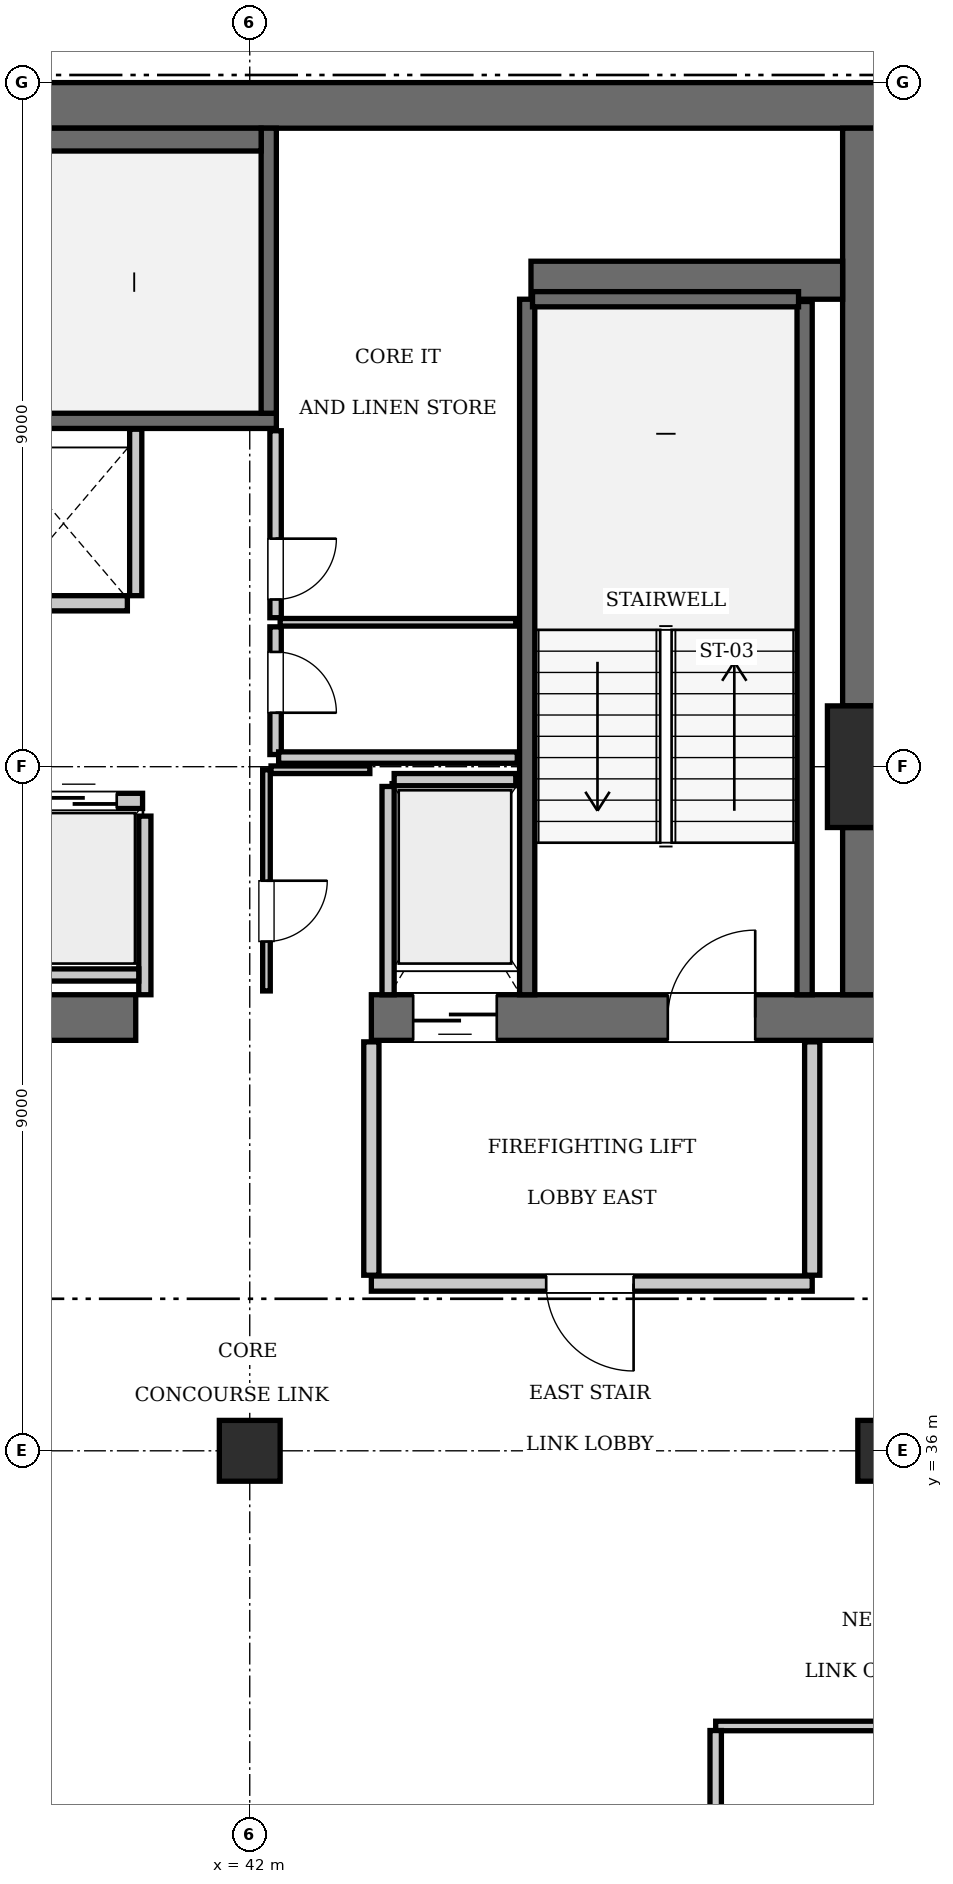
"""IFC4 building model, lengths in metres.
Left out: names, types, materials, properties, quantities, classifications, styles, units other than length and angle.
Written with IfcOpenShell. Run it as: python <this file> out.ifc"""

import sys

from ifc_helpers import new_model, si_unit, direction, frame, frame_2d, origin, origin_2d, place, context, subcontext, project, spatial, rectangle, extrude, element, fill, save


model = new_model("IFC4")
c1 = context("Model", 3, precision=1e-05, world=origin(), true_north=direction((0.0, 1.0)))
c2 = subcontext(c1, "Body", "Model", "MODEL_VIEW")
j1 = project(units=[si_unit("LENGTHUNIT", "METRE"), si_unit("PLANEANGLEUNIT", "RADIAN")], contexts=[c1])
p1 = place(None, origin())
s1 = spatial("IfcSite", under=j1, at=p1, CompositionType="ELEMENT")
p2 = place(p1, origin())
s2 = spatial("IfcBuilding", under=s1, at=p2, CompositionType="ELEMENT")
p3 = place(p2, frame((0.0, 0.0, 285.6)))
s3 = spatial("IfcBuildingStorey", under=s2, at=p3, CompositionType="ELEMENT", Elevation=285.6)
p4 = place(p3, frame((50.4, 45.0, 0.0), z_axis=(0.0, 0.0, 1.0), x_axis=(1.0, 0.0, 0.0)))
e1 = element("IfcColumn", 1, at=p4, inside=s3, PredefinedType="COLUMN", context=c2, shape_type="SweptSolid", body=[
    extrude(rectangle(XDim=1.6, YDim=1.6, at=origin_2d()), origin(), (0.0, 0.0, 1.0), 3.85),
])
p5 = place(p3, frame((25.2, 53.7, 0.0), z_axis=(0.0, 0.0, 1.0), x_axis=(1.0, 0.0, 0.0)))
e2 = element("IfcWall", 2, at=p5, inside=s3, PredefinedType="SHEAR", context=c2, shape_type="SweptSolid", body=[
    extrude(rectangle(XDim=25.2, YDim=0.6, at=frame_2d((12.6, 0.0))), origin(), (0.0, 0.0, 1.0), 3.85),
])
p6 = place(p3, frame((35.1, 41.7, 0.0), z_axis=(0.0, 0.0, 1.0), x_axis=(1.0, 0.0, 0.0)))
e3 = element("IfcWall", 3, at=p6, inside=s3, PredefinedType="SHEAR", context=c2, shape_type="SweptSolid", body=[
    extrude(rectangle(XDim=5.4, YDim=0.6, at=frame_2d((2.7, 0.0))), origin(), (0.0, 0.0, 1.0), 3.85),
])
p7 = place(p3, frame((43.6, 41.7, 0.0), z_axis=(0.0, 0.0, 1.0), x_axis=(1.0, 0.0, 0.0)))
e4 = element("IfcWall", 4, at=p7, inside=s3, PredefinedType="SHEAR", context=c2, shape_type="SweptSolid", body=[
    extrude(rectangle(XDim=6.8, YDim=0.6, at=frame_2d((3.4, 0.0))), origin(), (0.0, 0.0, 1.0), 3.85),
])
p8 = place(p7, frame((3.9, 0.0, 0.0)))
e5 = element("IfcOpeningElement", 5, at=p8, cuts=e4, PredefinedType="OPENING", context=c2, shape_type="SweptSolid", body=[
    extrude(rectangle(XDim=1.15, YDim=2.15, at=frame_2d((0.575, 1.075))), frame((0.0, 0.31, 0.0), z_axis=(0.0, -1.0, 0.0), x_axis=(1.0, 0.0, 0.0)), (0.0, 0.0, 1.0), 0.62),
])
p9 = place(p7, frame((0.55, 0.0, 0.0)))
e6 = element("IfcOpeningElement", 6, at=p9, cuts=e4, PredefinedType="OPENING", context=c2, shape_type="SweptSolid", body=[
    extrude(rectangle(XDim=1.1, YDim=2.2, at=frame_2d((0.55, 1.1))), frame((0.0, 0.31, 0.0), z_axis=(0.0, -1.0, 0.0), x_axis=(1.0, 0.0, 0.0)), (0.0, 0.0, 1.0), 0.62),
])
p10 = place(p3, frame((50.1, 42.0, 0.0), z_axis=(0.0, 0.0, 1.0), x_axis=(0.0, 1.0, 0.0)))
e7 = element("IfcWall", 7, at=p10, inside=s3, PredefinedType="SHEAR", context=c2, shape_type="SweptSolid", body=[
    extrude(rectangle(XDim=2.2, YDim=0.6, at=frame_2d((1.1, 0.0))), origin(), (0.0, 0.0, 1.0), 3.85),
])
p11 = place(p3, frame((50.1, 45.8, 0.0), z_axis=(0.0, 0.0, 1.0), x_axis=(0.0, 1.0, 0.0)))
e8 = element("IfcWall", 8, at=p11, inside=s3, PredefinedType="SHEAR", context=c2, shape_type="SweptSolid", body=[
    extrude(rectangle(XDim=7.6, YDim=0.6, at=frame_2d((3.8, 0.0))), origin(), (0.0, 0.0, 1.0), 3.85),
])
p12 = place(p3, frame((45.7, 51.4, 0.0), z_axis=(0.0, 0.0, 1.0), x_axis=(1.0, 0.0, 0.0)))
e9 = element("IfcWall", 9, at=p12, inside=s3, PredefinedType="SHEAR", context=c2, shape_type="SweptSolid", body=[
    extrude(rectangle(XDim=4.1, YDim=0.5, at=frame_2d((2.05, 0.0))), origin(), (0.0, 0.0, 1.0), 3.85),
])
for number, where, z_axis, x_axis in (
    (10, (42.0, 36.0, 0.0), (0.0, 0.0, 1.0), (1.0, 0.0, 0.0)),
    (11, (50.4, 36.0, 0.0), (0.0, 0.0, 1.0), (1.0, 0.0, 0.0)),
):
    element("IfcColumn", number, at=place(p3, frame(where, z_axis=z_axis, x_axis=x_axis)), inside=s3, PredefinedType="COLUMN", context=c2, shape_type="SweptSolid", body=[
        extrude(rectangle(XDim=0.8, YDim=0.8, at=origin_2d()), origin(), (0.0, 0.0, 1.0), 3.85),
    ])
p13 = place(p3, frame((33.25, 49.55, 0.0), z_axis=(0.0, 0.0, 1.0), x_axis=(1.0, 0.0, 0.0)))
e12 = element("IfcWall", 12, at=p13, inside=s3, PredefinedType="SOLIDWALL", context=c2, shape_type="SweptSolid", body=[
    extrude(rectangle(XDim=9.1, YDim=0.2, at=frame_2d((4.55, 0.0))), origin(), (0.0, 0.0, 1.0), 3.61),
])
p14 = place(p3, frame((42.25, 49.65, 0.0), z_axis=(0.0, 0.0, 1.0), x_axis=(0.0, 1.0, 0.0)))
e13 = element("IfcWall", 13, at=p14, inside=s3, PredefinedType="SOLIDWALL", context=c2, shape_type="SweptSolid", body=[
    extrude(rectangle(XDim=3.75, YDim=0.2, at=frame_2d((1.875, 0.0))), origin(), (0.0, 0.0, 1.0), 3.61),
])
p15 = place(p3, frame((33.45, 53.25, 0.0), z_axis=(0.0, 0.0, 1.0), x_axis=(1.0, 0.0, 0.0)))
e14 = element("IfcWall", 14, at=p15, inside=s3, PredefinedType="SOLIDWALL", context=c2, shape_type="SweptSolid", body=[
    extrude(rectangle(XDim=8.7, YDim=0.3, at=frame_2d((4.35, 0.0))), origin(), (0.0, 0.0, 1.0), 3.61),
])
p16 = place(p3, frame((45.65, 42.0, 0.0), z_axis=(0.0, 0.0, 1.0), x_axis=(0.0, 1.0, 0.0)))
e15 = element("IfcWall", 15, at=p16, inside=s3, PredefinedType="SOLIDWALL", context=c2, shape_type="SweptSolid", body=[
    extrude(rectangle(XDim=9.15, YDim=0.2, at=frame_2d((4.575, 0.0))), origin(), (0.0, 0.0, 1.0), 3.61),
])
p17 = place(p3, frame((49.3, 42.0, 0.0), z_axis=(0.0, 0.0, 1.0), x_axis=(0.0, 1.0, 0.0)))
e16 = element("IfcWall", 16, at=p17, inside=s3, PredefinedType="SOLIDWALL", context=c2, shape_type="SweptSolid", body=[
    extrude(rectangle(XDim=9.12, YDim=0.2, at=frame_2d((4.56, 0.0))), origin(), (0.0, 0.0, 1.0), 3.61),
])
p18 = place(p3, frame((45.72, 51.15, 0.0), z_axis=(0.0, 0.0, 1.0), x_axis=(1.0, 0.0, 0.0)))
e17 = element("IfcWall", 17, at=p18, inside=s3, PredefinedType="SOLIDWALL", context=c2, shape_type="SweptSolid", body=[
    extrude(rectangle(XDim=3.5, YDim=0.2, at=frame_2d((1.75, 0.0))), origin(), (0.0, 0.0, 1.0), 3.61),
])
p19 = place(p3, frame((38.91, 44.55, 0.0), z_axis=(0.0, 0.0, 1.0), x_axis=(1.0, 0.0, 0.0)))
e18 = element("IfcWall", 18, at=p19, inside=s3, PredefinedType="SOLIDWALL", context=c2, shape_type="SweptSolid", body=[
    extrude(rectangle(XDim=1.68, YDim=0.2, at=frame_2d((0.84, 0.0))), origin(), (0.0, 0.0, 1.0), 3.61),
])
p20 = place(p19, frame((0.34, 0.0, 0.0)))
e19 = element("IfcOpeningElement", 19, at=p20, cuts=e18, PredefinedType="OPENING", context=c2, shape_type="SweptSolid", body=[
    extrude(rectangle(XDim=1.0, YDim=2.15, at=frame_2d((0.5, 1.075))), frame((0.0, 0.11, 0.0), z_axis=(0.0, -1.0, 0.0), x_axis=(1.0, 0.0, 0.0)), (0.0, 0.0, 1.0), 0.22),
])
p21 = place(p3, frame((38.71, 47.15, 0.0), z_axis=(0.0, 0.0, 1.0), x_axis=(1.0, 0.0, 0.0)))
e20 = element("IfcWall", 20, at=p21, inside=s3, PredefinedType="SOLIDWALL", context=c2, shape_type="SweptSolid", body=[
    extrude(rectangle(XDim=1.68, YDim=0.2, at=frame_2d((0.84, 0.0))), origin(), (0.0, 0.0, 1.0), 3.61),
])
p22 = place(p3, frame((43.9, 44.83, 0.0), z_axis=(0.0, 0.0, 1.0), x_axis=(1.0, 0.0, 0.0)))
e21 = element("IfcWall", 21, at=p22, inside=s3, PredefinedType="SOLIDWALL", context=c2, shape_type="SweptSolid", body=[
    extrude(rectangle(XDim=1.6, YDim=0.16, at=frame_2d((0.8, 0.0))), origin(), (0.0, 0.0, 1.0), 3.61),
])
p23 = place(p3, frame((43.82, 42.0, 0.0), z_axis=(0.0, 0.0, 1.0), x_axis=(0.0, 1.0, 0.0)))
e22 = element("IfcWall", 22, at=p23, inside=s3, PredefinedType="SOLIDWALL", context=c2, shape_type="SweptSolid", body=[
    extrude(rectangle(XDim=2.74, YDim=0.16, at=frame_2d((1.37, 0.0))), origin(), (0.0, 0.0, 1.0), 3.61),
])
p24 = place(p3, frame((40.62, 42.0, 0.0), z_axis=(0.0, 0.0, 1.0), x_axis=(0.0, 1.0, 0.0)))
e23 = element("IfcWall", 23, at=p24, inside=s3, PredefinedType="SOLIDWALL", context=c2, shape_type="SweptSolid", body=[
    extrude(rectangle(XDim=2.35, YDim=0.16, at=frame_2d((1.175, 0.0))), origin(), (0.0, 0.0, 1.0), 3.61),
])
p25 = place(p3, frame((35.52, 42.26, 0.0), z_axis=(0.0, 0.0, 1.0), x_axis=(1.0, 0.0, 0.0)))
e24 = element("IfcWall", 24, at=p25, inside=s3, PredefinedType="SOLIDWALL", context=c2, shape_type="SweptSolid", body=[
    extrude(rectangle(XDim=5.02, YDim=0.16, at=frame_2d((2.51, 0.0))), origin(), (0.0, 0.0, 1.0), 3.61),
])
p26 = place(p3, frame((40.5, 47.25, 0.0), z_axis=(0.0, 0.0, 1.0), x_axis=(0.0, 1.0, 0.0)))
e25 = element("IfcWall", 25, at=p26, inside=s3, PredefinedType="SOLIDWALL", context=c2, shape_type="SweptSolid", body=[
    extrude(rectangle(XDim=2.19, YDim=0.16, at=frame_2d((1.095, 0.0))), origin(), (0.0, 0.0, 1.0), 3.61),
])
p27 = place(p3, frame((43.6, 38.2, 0.0), z_axis=(0.0, 0.0, 1.0), x_axis=(1.0, 0.0, 0.0)))
e26 = element("IfcWall", 26, at=p27, inside=s3, PredefinedType="PARTITIONING", context=c2, shape_type="SweptSolid", body=[
    extrude(rectangle(XDim=5.8, YDim=0.2, at=frame_2d((2.9, 0.0))), origin(), (0.0, 0.0, 1.0), 3.61),
])
p28 = place(p27, frame((2.3, 0.0, 0.0)))
e27 = element("IfcOpeningElement", 27, at=p28, cuts=e26, PredefinedType="OPENING", context=c2, shape_type="SweptSolid", body=[
    extrude(rectangle(XDim=1.15, YDim=2.15, at=frame_2d((0.575, 1.075))), frame((0.0, 0.11, 0.0), z_axis=(0.0, -1.0, 0.0), x_axis=(1.0, 0.0, 0.0)), (0.0, 0.0, 1.0), 0.22),
])
for number, where, z_axis, x_axis in (
    (28, (43.6, 38.31, 0.0), (0.0, 0.0, 1.0), (0.0, 1.0, 0.0)),
    (29, (49.4, 38.31, 0.0), (0.0, 0.0, 1.0), (0.0, 1.0, 0.0)),
):
    element("IfcWall", number, at=place(p3, frame(where, z_axis=z_axis, x_axis=x_axis)), inside=s3, PredefinedType="PARTITIONING", context=c2, shape_type="SweptSolid", body=[
        extrude(rectangle(XDim=3.07, YDim=0.2, at=frame_2d((1.535, 0.0))), origin(), (0.0, 0.0, 1.0), 3.61),
    ])
p29 = place(p3, frame((42.22, 42.05, 0.0), z_axis=(0.0, 0.0, 1.0), x_axis=(0.0, 1.0, 0.0)))
e30 = element("IfcWall", 30, at=p29, inside=s3, PredefinedType="PARTITIONING", context=c2, shape_type="SweptSolid", body=[
    extrude(rectangle(XDim=2.91, YDim=0.1, at=frame_2d((1.455, 0.0))), origin(), (0.0, 0.0, 1.0), 3.61),
])
p30 = place(p29, frame((0.65, 0.0, 0.0)))
e31 = element("IfcOpeningElement", 31, at=p30, cuts=e30, PredefinedType="OPENING", context=c2, shape_type="SweptSolid", body=[
    extrude(rectangle(XDim=0.8, YDim=2.05, at=frame_2d((0.4, 1.025))), frame((0.0, 0.06, 0.0), z_axis=(0.0, -1.0, 0.0), x_axis=(1.0, 0.0, 0.0)), (0.0, 0.0, 1.0), 0.12),
])
p31 = place(p3, frame((42.28, 44.96, 0.0), z_axis=(0.0, 0.0, 1.0), x_axis=(1.0, 0.0, 0.0)))
e32 = element("IfcWall", 32, at=p31, inside=s3, PredefinedType="PARTITIONING", context=c2, shape_type="SweptSolid", body=[
    extrude(rectangle(XDim=1.3, YDim=0.1, at=frame_2d((0.65, 0.0))), origin(), (0.0, 0.0, 1.0), 3.61),
])
p32 = place(p3, frame((42.34, 45.16, 0.0), z_axis=(0.0, 0.0, 1.0), x_axis=(0.0, 1.0, 0.0)))
e33 = element("IfcWall", 33, at=p32, inside=s3, PredefinedType="PARTITIONING", context=c2, shape_type="SweptSolid", body=[
    extrude(rectangle(XDim=1.68, YDim=0.15, at=frame_2d((0.84, 0.0))), origin(), (0.0, 0.0, 1.0), 3.61),
])
p33 = place(p32, frame((0.55, 0.0, 0.0)))
e34 = element("IfcOpeningElement", 34, at=p33, cuts=e33, PredefinedType="OPENING", context=c2, shape_type="SweptSolid", body=[
    extrude(rectangle(XDim=0.8, YDim=2.05, at=frame_2d((0.4, 1.025))), frame((0.0, 0.085, 0.0), z_axis=(0.0, -1.0, 0.0), x_axis=(1.0, 0.0, 0.0)), (0.0, 0.0, 1.0), 0.17),
])
p34 = place(p3, frame((42.34, 46.96, 0.0), z_axis=(0.0, 0.0, 1.0), x_axis=(0.0, 1.0, 0.0)))
e35 = element("IfcWall", 35, at=p34, inside=s3, PredefinedType="PARTITIONING", context=c2, shape_type="SweptSolid", body=[
    extrude(rectangle(XDim=2.46, YDim=0.15, at=frame_2d((1.23, 0.0))), origin(), (0.0, 0.0, 1.0), 3.61),
])
p35 = place(p34, frame((0.24, 0.0, 0.0)))
e36 = element("IfcOpeningElement", 36, at=p35, cuts=e35, PredefinedType="OPENING", context=c2, shape_type="SweptSolid", body=[
    extrude(rectangle(XDim=0.8, YDim=2.05, at=frame_2d((0.4, 1.025))), frame((0.0, 0.085, 0.0), z_axis=(0.0, -1.0, 0.0), x_axis=(1.0, 0.0, 0.0)), (0.0, 0.0, 1.0), 0.17),
])
p36 = place(p3, frame((42.4, 46.9, 0.0), z_axis=(0.0, 0.0, 1.0), x_axis=(1.0, 0.0, 0.0)))
e37 = element("IfcWall", 37, at=p36, inside=s3, PredefinedType="PARTITIONING", context=c2, shape_type="SweptSolid", body=[
    extrude(rectangle(XDim=3.1, YDim=0.1, at=frame_2d((1.55, 0.0))), origin(), (0.0, 0.0, 1.0), 3.61),
])
p37 = place(p3, frame((42.38, 45.12, 0.0), z_axis=(0.0, 0.0, 1.0), x_axis=(1.0, 0.0, 0.0)))
e38 = element("IfcWall", 38, at=p37, inside=s3, PredefinedType="PARTITIONING", context=c2, shape_type="SweptSolid", body=[
    extrude(rectangle(XDim=3.14, YDim=0.15, at=frame_2d((1.57, 0.0))), origin(), (0.0, 0.0, 1.0), 3.61),
])
p38 = place(p3, frame((48.13, 32.38, 0.0), z_axis=(0.0, 0.0, 1.0), x_axis=(1.0, 0.0, 0.0)))
e39 = element("IfcWall", 39, at=p38, inside=s3, PredefinedType="PARTITIONING", context=c2, shape_type="SweptSolid", body=[
    extrude(rectangle(XDim=11.97, YDim=0.125, at=frame_2d((5.985, 0.0))), origin(), (0.0, 0.0, 1.0), 3.61),
])
p39 = place(p3, frame((48.13, 30.43, 0.0), z_axis=(0.0, 0.0, 1.0), x_axis=(0.0, 1.0, 0.0)))
e40 = element("IfcWall", 40, at=p39, inside=s3, PredefinedType="PARTITIONING", context=c2, shape_type="SweptSolid", body=[
    extrude(rectangle(XDim=1.89, YDim=0.15, at=frame_2d((0.945, 0.0))), origin(), (0.0, 0.0, 1.0), 3.61),
])
p40 = place(p8, origin())
e41 = element("IfcDoor", 41, at=p40, inside=s3, OperationType="SINGLE_SWING_RIGHT", PredefinedType="DOOR", context=c2, shape_type="SweptSolid", body=[
    extrude(rectangle(XDim=1.15, YDim=2.15, at=frame_2d((0.575, 1.075))), frame((0.0, 0.025, 0.0), z_axis=(0.0, -1.0, 0.0), x_axis=(1.0, 0.0, 0.0)), (0.0, 0.0, 1.0), 0.05),
])
fill(e5, e41)
p41 = place(p20, origin())
e42 = element("IfcDoor", 42, at=p41, inside=s3, OperationType="SLIDING_TO_LEFT", PredefinedType="DOOR", context=c2, shape_type="SweptSolid", body=[
    extrude(rectangle(XDim=1.0, YDim=2.15, at=frame_2d((0.5, 1.075))), frame((0.0, 0.025, 0.0), z_axis=(0.0, -1.0, 0.0), x_axis=(1.0, 0.0, 0.0)), (0.0, 0.0, 1.0), 0.05),
])
fill(e19, e42)
p42 = place(p9, frame((1.1, 0.0, 0.0), z_axis=(0.0, 0.0, 1.0), x_axis=(-1.0, 0.0, 0.0)))
e43 = element("IfcDoor", 43, at=p42, inside=s3, OperationType="SLIDING_TO_LEFT", PredefinedType="DOOR", context=c2, shape_type="SweptSolid", body=[
    extrude(rectangle(XDim=1.1, YDim=2.2, at=frame_2d((0.55, 1.1))), frame((0.0, 0.025, 0.0), z_axis=(0.0, -1.0, 0.0), x_axis=(1.0, 0.0, 0.0)), (0.0, 0.0, 1.0), 0.05),
])
fill(e6, e43)
p43 = place(p28, frame((1.15, 0.0, 0.0), z_axis=(0.0, 0.0, 1.0), x_axis=(-1.0, 0.0, 0.0)))
e44 = element("IfcDoor", 44, at=p43, inside=s3, OperationType="SINGLE_SWING_LEFT", PredefinedType="DOOR", context=c2, shape_type="SweptSolid", body=[
    extrude(rectangle(XDim=1.15, YDim=2.15, at=frame_2d((0.575, 1.075))), frame((0.0, 0.025, 0.0), z_axis=(0.0, -1.0, 0.0), x_axis=(1.0, 0.0, 0.0)), (0.0, 0.0, 1.0), 0.05),
])
fill(e27, e44)
p44 = place(p30, frame((0.8, 0.0, 0.0), z_axis=(0.0, 0.0, 1.0), x_axis=(-1.0, 0.0, 0.0)))
e45 = element("IfcDoor", 45, at=p44, inside=s3, OperationType="SINGLE_SWING_LEFT", PredefinedType="DOOR", context=c2, shape_type="SweptSolid", body=[
    extrude(rectangle(XDim=0.8, YDim=2.05, at=frame_2d((0.4, 1.025))), frame((0.0, 0.025, 0.0), z_axis=(0.0, -1.0, 0.0), x_axis=(1.0, 0.0, 0.0)), (0.0, 0.0, 1.0), 0.05),
])
fill(e31, e45)
p45 = place(p33, frame((0.8, 0.0, 0.0), z_axis=(0.0, 0.0, 1.0), x_axis=(-1.0, 0.0, 0.0)))
e46 = element("IfcDoor", 46, at=p45, inside=s3, OperationType="SINGLE_SWING_RIGHT", PredefinedType="DOOR", context=c2, shape_type="SweptSolid", body=[
    extrude(rectangle(XDim=0.8, YDim=2.05, at=frame_2d((0.4, 1.025))), frame((0.0, 0.025, 0.0), z_axis=(0.0, -1.0, 0.0), x_axis=(1.0, 0.0, 0.0)), (0.0, 0.0, 1.0), 0.05),
])
fill(e34, e46)
p46 = place(p35, frame((0.8, 0.0, 0.0), z_axis=(0.0, 0.0, 1.0), x_axis=(-1.0, 0.0, 0.0)))
e47 = element("IfcDoor", 47, at=p46, inside=s3, OperationType="SINGLE_SWING_LEFT", PredefinedType="DOOR", context=c2, shape_type="SweptSolid", body=[
    extrude(rectangle(XDim=0.8, YDim=2.05, at=frame_2d((0.4, 1.025))), frame((0.0, 0.025, 0.0), z_axis=(0.0, -1.0, 0.0), x_axis=(1.0, 0.0, 0.0)), (0.0, 0.0, 1.0), 0.05),
])
fill(e36, e47)
save(model, sys.argv[1])
